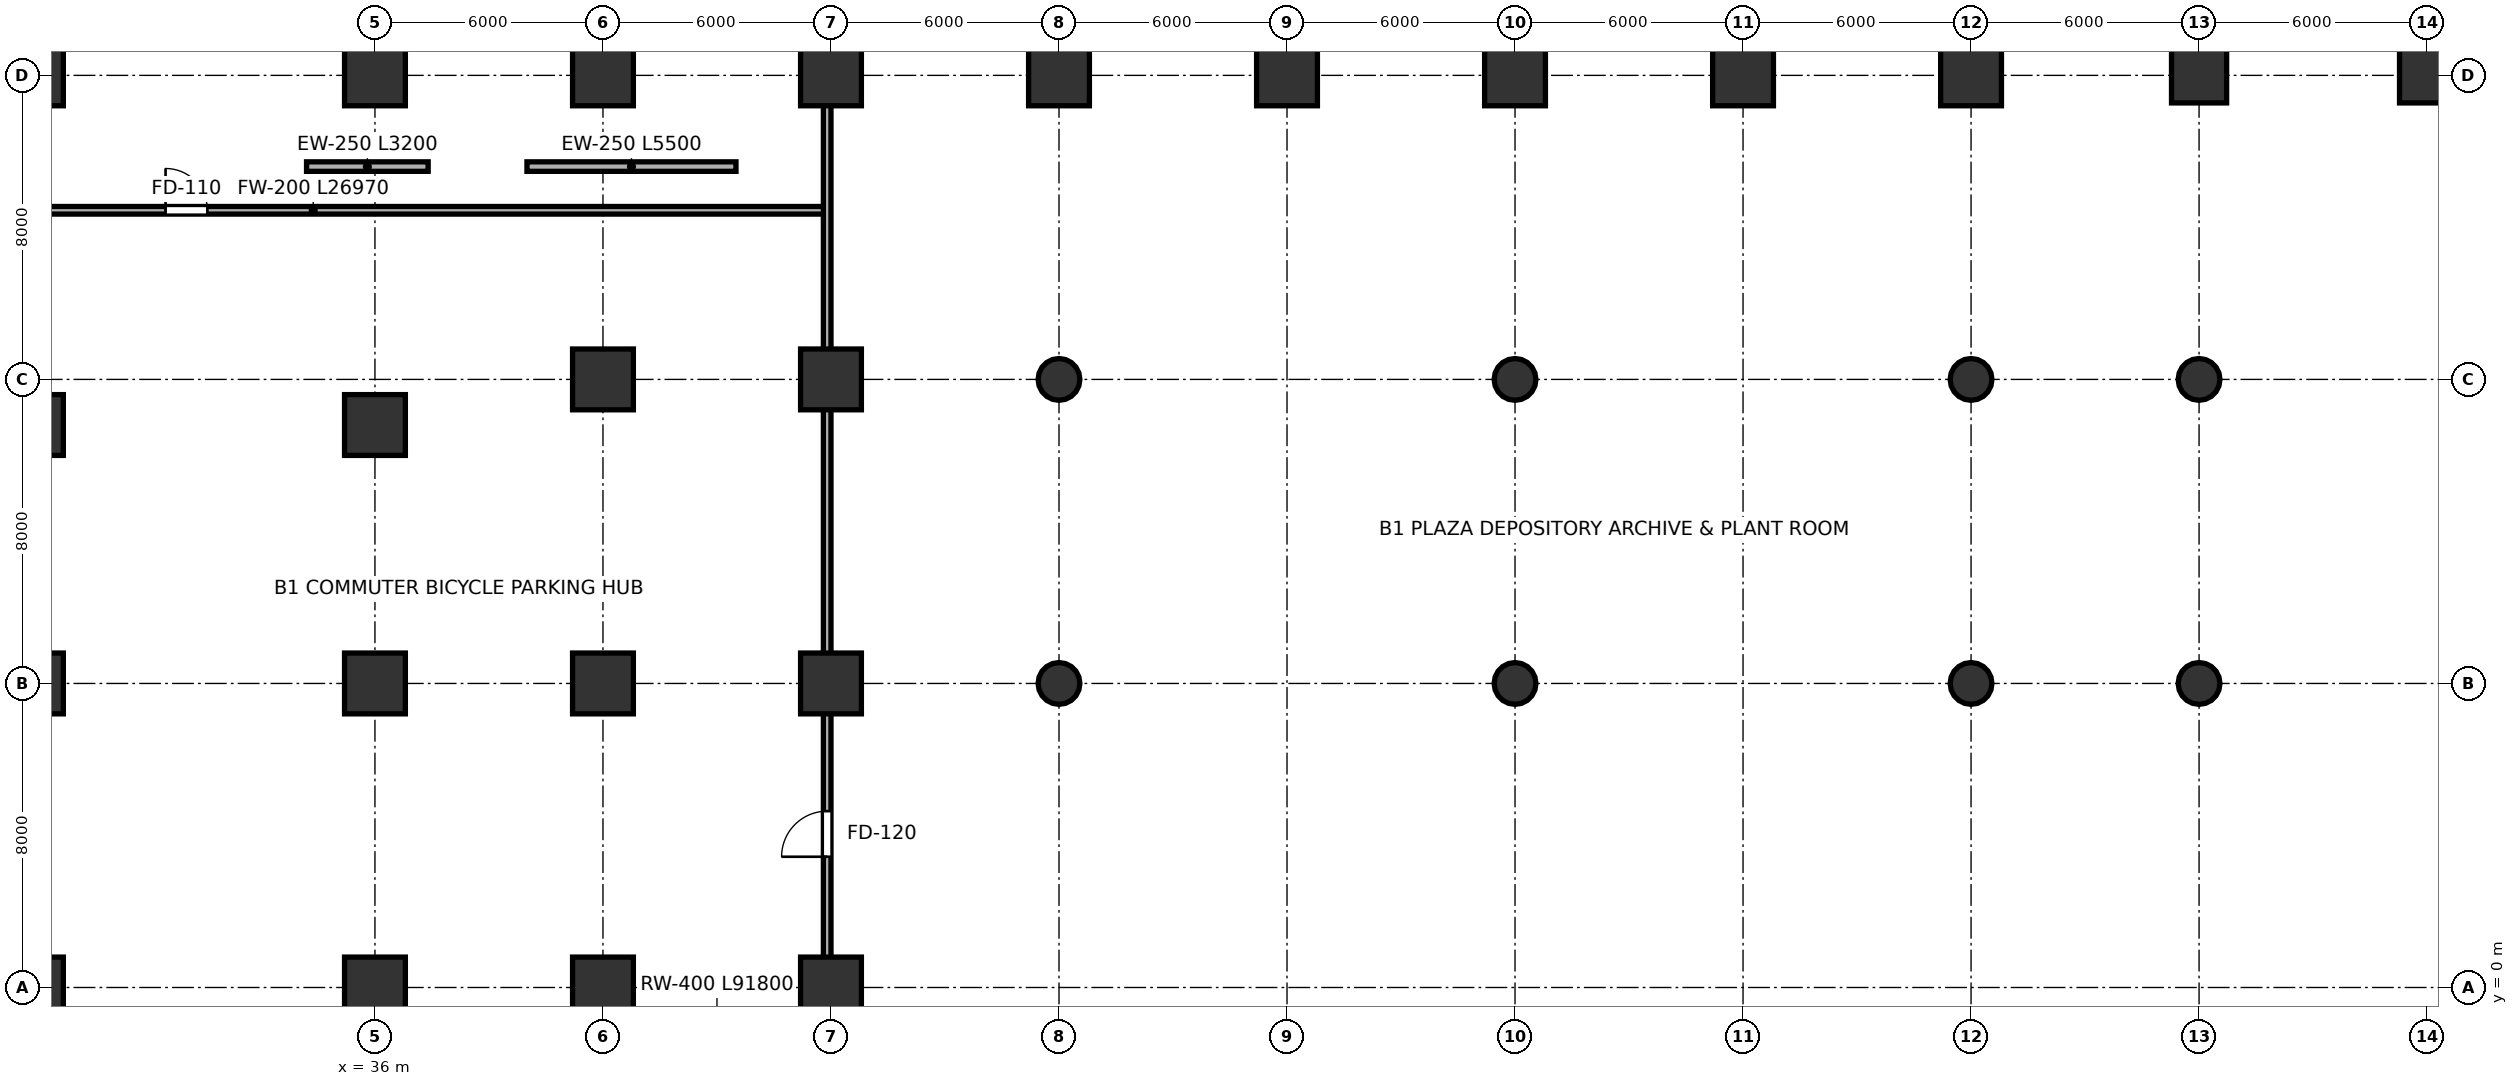
"""IFC4 building model, lengths in metres.
Left out: names, types, materials, properties, quantities, classifications, styles, units other than length and angle.
Written with IfcOpenShell. Run it as: python <this file> out.ifc"""

import sys

from ifc_helpers import new_model, si_unit, direction, frame, frame_2d, origin, origin_2d, place, context, subcontext, project, spatial, rectangle, circle, extrude, source, transform, mapped, element, fill, save


model = new_model("IFC4")
c1 = context("Model", 3, precision=1e-05, world=origin(), true_north=direction((0.0, 1.0)))
c2 = subcontext(c1, "Body", "Model", "MODEL_VIEW")
j1 = project(units=[si_unit("LENGTHUNIT", "METRE"), si_unit("PLANEANGLEUNIT", "RADIAN")], contexts=[c1])
p1 = place(None, origin())
s1 = spatial("IfcSite", under=j1, at=p1, CompositionType="ELEMENT")
p2 = place(p1, origin())
s2 = spatial("IfcBuilding", under=s1, at=p2, CompositionType="ELEMENT")
p3 = place(p2, frame((0.0, 0.0, -4.8)))
s3 = spatial("IfcBuildingStorey", under=s2, at=p3, CompositionType="ELEMENT", Elevation=-4.8)
m1 = source(origin(), c2, "Body", "SweptSolid", [
    extrude(rectangle(XDim=1.6, YDim=1.6, at=origin_2d()), origin(), (0.0, 0.0, 1.0), 4.799),
])
p4 = place(p3, frame((27.0, 0.0, 0.001), z_axis=(0.0, 0.0, 1.0), x_axis=(1.0, 0.0, 0.0)))
e1 = element("IfcColumn", 1, at=p4, inside=s3, PredefinedType="COLUMN", context=c2, shape_type="MappedRepresentation", body=[
    mapped(m1, transform((0.0, 0.0, 0.0), scale=1.0)),
])
m2 = source(origin(), c2, "Body", "SweptSolid", [
    extrude(rectangle(XDim=1.6, YDim=1.6, at=origin_2d()), origin(), (0.0, 0.0, 1.0), 4.799),
])
for number, where, z_axis, x_axis in (
    (2, (27.0, 8.0, 0.001), (0.0, 0.0, 1.0), (1.0, 0.0, 0.0)),
    (3, (27.0, 24.0, 0.001), (0.0, 0.0, 1.0), (1.0, 0.0, 0.0)),
    (4, (27.0, 14.8, 0.001), (0.0, 0.0, 1.0), (1.0, 0.0, 0.0)),
):
    element("IfcColumn", number, at=place(p3, frame(where, z_axis=z_axis, x_axis=x_axis)), inside=s3, PredefinedType="COLUMN", context=c2, shape_type="MappedRepresentation", body=[
        mapped(m2, transform((0.0, 0.0, 0.0), scale=1.0)),
    ])
p5 = place(p3, frame((36.0, 0.0, 0.001), z_axis=(0.0, 0.0, 1.0), x_axis=(1.0, 0.0, 0.0)))
e5 = element("IfcColumn", 5, at=p5, inside=s3, PredefinedType="COLUMN", context=c2, shape_type="MappedRepresentation", body=[
    mapped(m1, transform((0.0, 0.0, 0.0), scale=1.0)),
])
for number, where, z_axis, x_axis in (
    (6, (36.0, 8.0, 0.001), (0.0, 0.0, 1.0), (1.0, 0.0, 0.0)),
    (7, (36.0, 24.0, 0.001), (0.0, 0.0, 1.0), (1.0, 0.0, 0.0)),
    (8, (36.0, 14.8, 0.001), (0.0, 0.0, 1.0), (1.0, 0.0, 0.0)),
):
    element("IfcColumn", number, at=place(p3, frame(where, z_axis=z_axis, x_axis=x_axis)), inside=s3, PredefinedType="COLUMN", context=c2, shape_type="MappedRepresentation", body=[
        mapped(m2, transform((0.0, 0.0, 0.0), scale=1.0)),
    ])
p6 = place(p3, frame((42.0, 0.0, 0.001), z_axis=(0.0, 0.0, 1.0), x_axis=(1.0, 0.0, 0.0)))
e9 = element("IfcColumn", 9, at=p6, inside=s3, PredefinedType="COLUMN", context=c2, shape_type="MappedRepresentation", body=[
    mapped(m1, transform((0.0, 0.0, 0.0), scale=1.0)),
])
for number, where, z_axis, x_axis in (
    (10, (42.0, 8.0, 0.001), (0.0, 0.0, 1.0), (1.0, 0.0, 0.0)),
    (11, (42.0, 16.0, 0.001), (0.0, 0.0, 1.0), (1.0, 0.0, 0.0)),
    (12, (42.0, 24.0, 0.001), (0.0, 0.0, 1.0), (1.0, 0.0, 0.0)),
):
    element("IfcColumn", number, at=place(p3, frame(where, z_axis=z_axis, x_axis=x_axis)), inside=s3, PredefinedType="COLUMN", context=c2, shape_type="MappedRepresentation", body=[
        mapped(m2, transform((0.0, 0.0, 0.0), scale=1.0)),
    ])
m3 = source(origin(), c2, "Body", "SweptSolid", [
    extrude(rectangle(XDim=1.6, YDim=1.6, at=origin_2d()), origin(), (0.0, 0.0, 1.0), 4.599),
])
p7 = place(p3, frame((48.0, 0.0, 0.001), z_axis=(0.0, 0.0, 1.0), x_axis=(1.0, 0.0, 0.0)))
e13 = element("IfcColumn", 13, at=p7, inside=s3, PredefinedType="COLUMN", context=c2, shape_type="MappedRepresentation", body=[
    mapped(m3, transform((0.0, 0.0, 0.0), scale=1.0)),
])
for number, where, z_axis, x_axis in (
    (14, (48.0, 8.0, 0.001), (0.0, 0.0, 1.0), (1.0, 0.0, 0.0)),
    (15, (48.0, 16.0, 0.001), (0.0, 0.0, 1.0), (1.0, 0.0, 0.0)),
    (16, (48.0, 24.0, 0.001), (0.0, 0.0, 1.0), (1.0, 0.0, 0.0)),
    (17, (54.0, 24.0, 0.001), (0.0, 0.0, 1.0), (1.0, 0.0, 0.0)),
    (18, (60.0, 24.0, 0.001), (0.0, 0.0, 1.0), (1.0, 0.0, 0.0)),
    (19, (66.0, 24.0, 0.001), (0.0, 0.0, 1.0), (1.0, 0.0, 0.0)),
    (20, (72.0, 24.0, 0.001), (0.0, 0.0, 1.0), (1.0, 0.0, 0.0)),
):
    element("IfcColumn", number, at=place(p3, frame(where, z_axis=z_axis, x_axis=x_axis)), inside=s3, PredefinedType="COLUMN", context=c2, shape_type="MappedRepresentation", body=[
        mapped(m2, transform((0.0, 0.0, 0.0), scale=1.0)),
    ])
m4 = source(origin(), c2, "Body", "SweptSolid", [
    extrude(rectangle(XDim=1.6, YDim=1.6, at=origin_2d()), origin(), (0.0, 0.0, 1.0), 4.599),
])
p8 = place(p3, frame((78.0, 24.0, 0.001), z_axis=(0.0, 0.0, 1.0), x_axis=(1.0, 0.0, 0.0)))
e21 = element("IfcColumn", 21, at=p8, inside=s3, PredefinedType="COLUMN", context=c2, shape_type="MappedRepresentation", body=[
    mapped(m4, transform((0.0, 0.0, 0.0), scale=1.0)),
])
m5 = source(origin(), c2, "Body", "SweptSolid", [
    extrude(rectangle(XDim=1.45, YDim=1.45, at=origin_2d()), origin(), (0.0, 0.0, 1.0), 4.599),
])
p9 = place(p3, frame((84.0, 24.0, 0.001), z_axis=(0.0, 0.0, 1.0), x_axis=(1.0, 0.0, 0.0)))
e22 = element("IfcColumn", 22, at=p9, inside=s3, PredefinedType="COLUMN", context=c2, shape_type="MappedRepresentation", body=[
    mapped(m5, transform((0.0, 0.0, 0.0), scale=1.0)),
])
m6 = source(origin(), c2, "Body", "SweptSolid", [
    extrude(rectangle(XDim=1.45, YDim=1.45, at=origin_2d()), origin(), (0.0, 0.0, 1.0), 4.599),
])
p10 = place(p3, frame((90.0, 24.0, 0.001), z_axis=(0.0, 0.0, 1.0), x_axis=(1.0, 0.0, 0.0)))
e23 = element("IfcColumn", 23, at=p10, inside=s3, PredefinedType="COLUMN", context=c2, shape_type="MappedRepresentation", body=[
    mapped(m6, transform((0.0, 0.0, 0.0), scale=1.0)),
])
m7 = source(origin(), c2, "Body", "SweptSolid", [
    extrude(circle(Radius=0.55, at=origin_2d()), origin(), (0.0, 0.0, 1.0), 4.799),
])
for number, where, z_axis, x_axis in (
    (24, (54.0, 8.0, 0.001), (0.0, 0.0, 1.0), (1.0, 0.0, 0.0)),
    (25, (66.0, 8.0, 0.001), (0.0, 0.0, 1.0), (1.0, 0.0, 0.0)),
    (26, (78.0, 8.0, 0.001), (0.0, 0.0, 1.0), (1.0, 0.0, 0.0)),
    (27, (84.0, 8.0, 0.001), (0.0, 0.0, 1.0), (1.0, 0.0, 0.0)),
    (28, (54.0, 16.0, 0.001), (0.0, 0.0, 1.0), (1.0, 0.0, 0.0)),
    (29, (66.0, 16.0, 0.001), (0.0, 0.0, 1.0), (1.0, 0.0, 0.0)),
    (30, (78.0, 16.0, 0.001), (0.0, 0.0, 1.0), (1.0, 0.0, 0.0)),
    (31, (84.0, 16.0, 0.001), (0.0, 0.0, 1.0), (1.0, 0.0, 0.0)),
):
    element("IfcColumn", number, at=place(p3, frame(where, z_axis=z_axis, x_axis=x_axis)), inside=s3, PredefinedType="USERDEFINED", context=c2, shape_type="MappedRepresentation", body=[
        mapped(m7, transform((0.0, 0.0, 0.0), scale=1.0)),
    ])
p11 = place(p3, frame((34.2, 21.6, 0.0), z_axis=(0.0, 0.0, 1.0), x_axis=(1.0, 0.0, 0.0)))
e32 = element("IfcWall", 32, at=p11, inside=s3, PredefinedType="SOLIDWALL", context=c2, shape_type="SweptSolid", body=[
    extrude(rectangle(XDim=3.2, YDim=0.25, at=frame_2d((1.6, 0.0))), origin(), (0.0, 0.0, 1.0), 3.1),
])
p12 = place(p3, frame((40.0, 21.6, 0.0), z_axis=(0.0, 0.0, 1.0), x_axis=(1.0, 0.0, 0.0)))
e33 = element("IfcWall", 33, at=p12, inside=s3, PredefinedType="SOLIDWALL", context=c2, shape_type="SweptSolid", body=[
    extrude(rectangle(XDim=5.5, YDim=0.25, at=frame_2d((2.75, 0.0))), origin(), (0.0, 0.0, 1.0), 3.1),
])
p13 = place(p3, frame((20.89, 20.45, 0.0), z_axis=(0.0, 0.0, 1.0), x_axis=(1.0, 0.0, 0.0)))
e34 = element("IfcWall", 34, at=p13, inside=s3, PredefinedType="SOLIDWALL", context=c2, shape_type="SweptSolid", body=[
    extrude(rectangle(XDim=26.97, YDim=0.2, at=frame_2d((13.485, 0.0))), origin(), (0.0, 0.0, 1.0), 3.65),
])
p14 = place(p13, frame((9.6, 0.0, 0.0)))
e35 = element("IfcOpeningElement", 35, at=p14, cuts=e34, PredefinedType="OPENING", context=c2, shape_type="SweptSolid", body=[
    extrude(rectangle(XDim=1.1, YDim=2.2, at=frame_2d((0.55, 1.1))), frame((0.0, 0.11, 0.0), z_axis=(0.0, -1.0, 0.0), x_axis=(1.0, 0.0, 0.0)), (0.0, 0.0, 1.0), 0.22),
])
p15 = place(p3, frame((47.9, -0.56, 0.0), z_axis=(0.0, 0.0, 1.0), x_axis=(0.0, 1.0, 0.0)))
e36 = element("IfcWall", 36, at=p15, inside=s3, PredefinedType="SOLIDWALL", context=c2, shape_type="SweptSolid", body=[
    extrude(rectangle(XDim=24.87, YDim=0.2, at=frame_2d((12.435, 0.0))), origin(), (0.0, 0.0, 1.0), 3.655),
])
p16 = place(p15, frame((4.0, 0.0, 0.0)))
e37 = element("IfcOpeningElement", 37, at=p16, cuts=e36, PredefinedType="OPENING", context=c2, shape_type="SweptSolid", body=[
    extrude(rectangle(XDim=1.2, YDim=2.2, at=frame_2d((0.6, 1.1))), frame((0.0, 0.11, 0.0), z_axis=(0.0, -1.0, 0.0), x_axis=(1.0, 0.0, 0.0)), (0.0, 0.0, 1.0), 0.22),
])
m8 = source(origin(), c2, "Body", "SweptSolid", [
    extrude(rectangle(XDim=1.1, YDim=2.2, at=frame_2d((0.55, 1.1))), frame((0.0, 0.025, 0.0), z_axis=(0.0, -1.0, 0.0), x_axis=(1.0, 0.0, 0.0)), (0.0, 0.0, 1.0), 0.05),
])
p17 = place(p14, origin())
e38 = element("IfcDoor", 38, at=p17, inside=s3, OperationType="SINGLE_SWING_LEFT", PredefinedType="DOOR", context=c2, shape_type="MappedRepresentation", body=[
    mapped(m8, transform((0.0, 0.0, 0.0), scale=1.0)),
])
fill(e35, e38)
m9 = source(origin(), c2, "Body", "SweptSolid", [
    extrude(rectangle(XDim=1.2, YDim=2.2, at=frame_2d((0.6, 1.1))), frame((0.0, 0.025, 0.0), z_axis=(0.0, -1.0, 0.0), x_axis=(1.0, 0.0, 0.0)), (0.0, 0.0, 1.0), 0.05),
])
p18 = place(p16, origin())
e39 = element("IfcDoor", 39, at=p18, inside=s3, OperationType="SINGLE_SWING_LEFT", PredefinedType="DOOR", context=c2, shape_type="MappedRepresentation", body=[
    mapped(m9, transform((0.0, 0.0, 0.0), scale=1.0)),
])
fill(e37, e39)
save(model, sys.argv[1])
